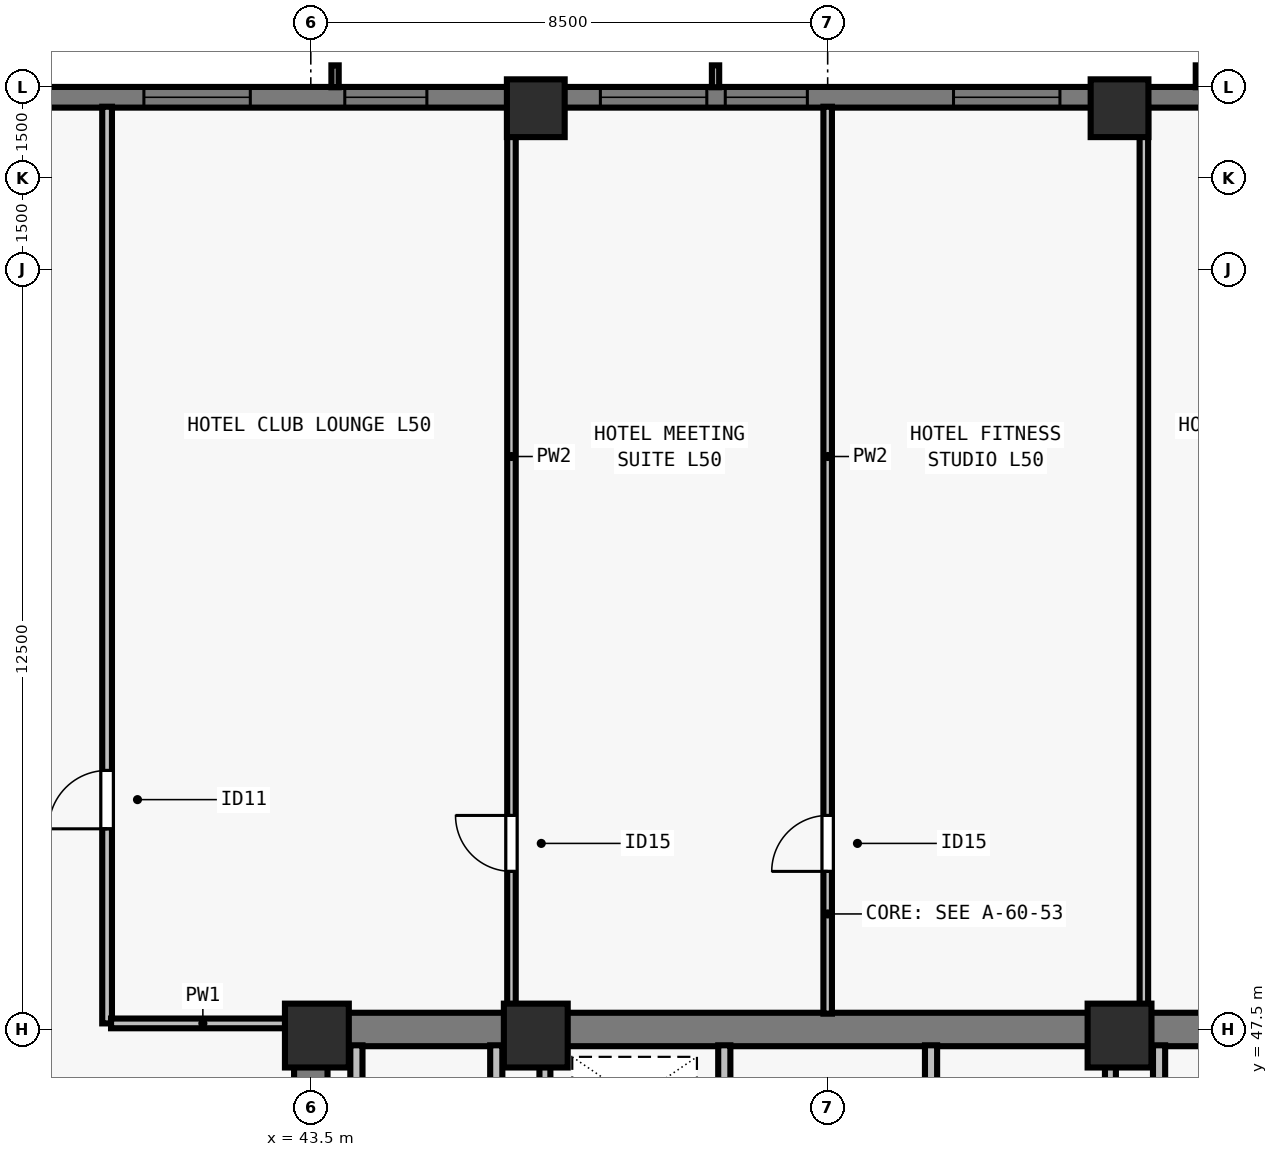
"""IFC4 building model, lengths in metres.
Left out: names, types, materials, properties, quantities, classifications, styles, units other than length and angle.
Written with IfcOpenShell. Run it as: python <this file> out.ifc"""

import sys

from ifc_helpers import new_model, si_unit, direction, frame, frame_2d, origin, origin_2d, place, context, subcontext, project, spatial, rectangle, extrude, element, fill, save


model = new_model("IFC4")
c1 = context("Model", 3, precision=1e-05, world=origin(), true_north=direction((0.0, 1.0)))
c2 = subcontext(c1, "Body", "Model", "MODEL_VIEW")
j1 = project(units=[si_unit("LENGTHUNIT", "METRE"), si_unit("PLANEANGLEUNIT", "RADIAN")], contexts=[c1])
p1 = place(None, origin())
s1 = spatial("IfcSite", under=j1, at=p1, CompositionType="ELEMENT")
p2 = place(p1, origin())
s2 = spatial("IfcBuilding", under=s1, at=p2, CompositionType="ELEMENT")
p3 = place(p2, frame((0.0, 0.0, 183.0)))
s3 = spatial("IfcBuildingStorey", under=s2, at=p3, CompositionType="ELEMENT", Elevation=183.0)
for number, where, z_axis, x_axis in (
    (1, (43.6, 47.4, 0.0), (0.0, 0.0, 1.0), (1.0, 0.0, 0.0)),
    (2, (47.2, 47.4, 0.0), (0.0, 0.0, 1.0), (1.0, 0.0, 0.0)),
    (3, (56.8, 47.4, 0.0), (0.0, 0.0, 1.0), (1.0, 0.0, 0.0)),
):
    element("IfcColumn", number, at=place(p3, frame(where, z_axis=z_axis, x_axis=x_axis)), inside=s3, PredefinedType="COLUMN", context=c2, shape_type="SweptSolid", body=[
        extrude(rectangle(XDim=1.05, YDim=1.05, at=origin_2d()), origin(), (0.0, 0.0, 1.0), 3.5),
    ])
for number, where, z_axis, x_axis in (
    (4, (56.8, 62.65, 0.0), (0.0, 0.0, 1.0), (1.0, 0.0, 0.0)),
    (5, (47.2, 62.65, 0.0), (0.0, 0.0, 1.0), (1.0, 0.0, 0.0)),
):
    element("IfcColumn", number, at=place(p3, frame(where, z_axis=z_axis, x_axis=x_axis)), inside=s3, PredefinedType="COLUMN", context=c2, shape_type="SweptSolid", body=[
        extrude(rectangle(XDim=0.95, YDim=0.95, at=origin_2d()), origin(), (0.0, 0.0, 1.0), 3.5),
    ])
p4 = place(p3, frame((32.0, 62.83, 0.0), z_axis=(0.0, 0.0, 1.0), x_axis=(1.0, 0.0, 0.0)))
e6 = element("IfcWall", 6, at=p4, inside=s3, PredefinedType="SOLIDWALL", context=c2, shape_type="SweptSolid", body=[
    extrude(rectangle(XDim=39.682, YDim=0.34, at=frame_2d((19.841, 0.0))), origin(), (0.0, 0.0, 1.0), 3.28),
])
p5 = place(p4, frame((4.102, 0.0, 0.8)))
e7 = element("IfcOpeningElement", 7, at=p5, cuts=e6, PredefinedType="OPENING", context=c2, shape_type="SweptSolid", body=[
    extrude(rectangle(XDim=1.35, YDim=1.66, at=frame_2d((0.675, 0.83))), frame((0.0, 0.18, 0.0), z_axis=(0.0, -1.0, 0.0), x_axis=(1.0, 0.0, 0.0)), (0.0, 0.0, 1.0), 0.36),
])
p6 = place(p4, frame((8.755, 0.0, 0.8)))
e8 = element("IfcOpeningElement", 8, at=p6, cuts=e6, PredefinedType="OPENING", context=c2, shape_type="SweptSolid", body=[
    extrude(rectangle(XDim=1.75, YDim=1.66, at=frame_2d((0.875, 0.83))), frame((0.0, 0.18, 0.0), z_axis=(0.0, -1.0, 0.0), x_axis=(1.0, 0.0, 0.0)), (0.0, 0.0, 1.0), 0.36),
])
p7 = place(p4, frame((12.059, 0.0, 0.8)))
e9 = element("IfcOpeningElement", 9, at=p7, cuts=e6, PredefinedType="OPENING", context=c2, shape_type="SweptSolid", body=[
    extrude(rectangle(XDim=1.35, YDim=1.66, at=frame_2d((0.675, 0.83))), frame((0.0, 0.18, 0.0), z_axis=(0.0, -1.0, 0.0), x_axis=(1.0, 0.0, 0.0)), (0.0, 0.0, 1.0), 0.36),
])
p8 = place(p4, frame((16.262, 0.0, 0.8)))
e10 = element("IfcOpeningElement", 10, at=p8, cuts=e6, PredefinedType="OPENING", context=c2, shape_type="SweptSolid", body=[
    extrude(rectangle(XDim=1.75, YDim=1.66, at=frame_2d((0.875, 0.83))), frame((0.0, 0.18, 0.0), z_axis=(0.0, -1.0, 0.0), x_axis=(1.0, 0.0, 0.0)), (0.0, 0.0, 1.0), 0.36),
])
p9 = place(p4, frame((18.316, 0.0, 0.8)))
e11 = element("IfcOpeningElement", 11, at=p9, cuts=e6, PredefinedType="OPENING", context=c2, shape_type="SweptSolid", body=[
    extrude(rectangle(XDim=1.35, YDim=1.66, at=frame_2d((0.675, 0.83))), frame((0.0, 0.18, 0.0), z_axis=(0.0, -1.0, 0.0), x_axis=(1.0, 0.0, 0.0)), (0.0, 0.0, 1.0), 0.36),
])
p10 = place(p4, frame((22.07, 0.0, 0.8)))
e12 = element("IfcOpeningElement", 12, at=p10, cuts=e6, PredefinedType="OPENING", context=c2, shape_type="SweptSolid", body=[
    extrude(rectangle(XDim=1.75, YDim=1.66, at=frame_2d((0.875, 0.83))), frame((0.0, 0.18, 0.0), z_axis=(0.0, -1.0, 0.0), x_axis=(1.0, 0.0, 0.0)), (0.0, 0.0, 1.0), 0.36),
])
p11 = place(p4, frame((26.273, 0.0, 0.8)))
e13 = element("IfcOpeningElement", 13, at=p11, cuts=e6, PredefinedType="OPENING", context=c2, shape_type="SweptSolid", body=[
    extrude(rectangle(XDim=1.35, YDim=1.66, at=frame_2d((0.675, 0.83))), frame((0.0, 0.18, 0.0), z_axis=(0.0, -1.0, 0.0), x_axis=(1.0, 0.0, 0.0)), (0.0, 0.0, 1.0), 0.36),
])
p12 = place(p4, frame((33.38, 0.0, 0.8)))
e14 = element("IfcOpeningElement", 14, at=p12, cuts=e6, PredefinedType="OPENING", context=c2, shape_type="SweptSolid", body=[
    extrude(rectangle(XDim=1.35, YDim=1.66, at=frame_2d((0.675, 0.83))), frame((0.0, 0.18, 0.0), z_axis=(0.0, -1.0, 0.0), x_axis=(1.0, 0.0, 0.0)), (0.0, 0.0, 1.0), 0.36),
])
p13 = place(p3, frame((43.225, 47.5, 0.0), z_axis=(0.0, 0.0, 1.0), x_axis=(1.0, 0.0, 0.0)))
e15 = element("IfcWall", 15, at=p13, inside=s3, PredefinedType="SHEAR", context=c2, shape_type="SweptSolid", body=[
    extrude(rectangle(XDim=17.55, YDim=0.55, at=frame_2d((8.775, 0.0))), origin(), (0.0, 0.0, 1.0), 3.28),
])
p14 = place(p3, frame((43.5, 40.8, 0.0), z_axis=(0.0, 0.0, 1.0), x_axis=(0.0, 1.0, 0.0)))
e16 = element("IfcWall", 16, at=p14, inside=s3, PredefinedType="SHEAR", context=c2, shape_type="SweptSolid", body=[
    extrude(rectangle(XDim=6.435, YDim=0.55, at=frame_2d((3.218, 0.0))), origin(), (0.0, 0.0, 1.0), 3.28),
])
p15 = place(p3, frame((50.3, 40.585, 0.0), z_axis=(0.0, 0.0, 1.0), x_axis=(0.0, 1.0, 0.0)))
e17 = element("IfcWall", 17, at=p15, inside=s3, PredefinedType="SOLIDWALL", context=c2, shape_type="SweptSolid", body=[
    extrude(rectangle(XDim=6.655, YDim=0.2, at=frame_2d((3.328, 0.0))), origin(), (0.0, 0.0, 1.0), 3.28),
])
p16 = place(p15, frame((5.065, 0.0, 0.0)))
e18 = element("IfcOpeningElement", 18, at=p16, cuts=e17, PredefinedType="OPENING", context=c2, shape_type="SweptSolid", body=[
    extrude(rectangle(XDim=0.8, YDim=2.08, at=frame_2d((0.4, 1.04))), frame((0.0, 0.11, 0.0), z_axis=(0.0, -1.0, 0.0), x_axis=(1.0, 0.0, 0.0)), (0.0, 0.0, 1.0), 0.22),
])
p17 = place(p3, frame((53.7, 40.585, 0.0), z_axis=(0.0, 0.0, 1.0), x_axis=(0.0, 1.0, 0.0)))
e19 = element("IfcWall", 19, at=p17, inside=s3, PredefinedType="SOLIDWALL", context=c2, shape_type="SweptSolid", body=[
    extrude(rectangle(XDim=6.655, YDim=0.2, at=frame_2d((3.328, 0.0))), origin(), (0.0, 0.0, 1.0), 3.28),
])
p18 = place(p17, frame((0.195, 0.0, 0.0)))
e20 = element("IfcOpeningElement", 20, at=p18, cuts=e19, PredefinedType="OPENING", context=c2, shape_type="SweptSolid", body=[
    extrude(rectangle(XDim=0.8, YDim=2.08, at=frame_2d((0.4, 1.04))), frame((0.0, 0.11, 0.0), z_axis=(0.0, -1.0, 0.0), x_axis=(1.0, 0.0, 0.0)), (0.0, 0.0, 1.0), 0.22),
])
p19 = place(p17, frame((4.265, 0.0, 0.0)))
e21 = element("IfcOpeningElement", 21, at=p19, cuts=e19, PredefinedType="OPENING", context=c2, shape_type="SweptSolid", body=[
    extrude(rectangle(XDim=0.95, YDim=2.12, at=frame_2d((0.475, 1.06))), frame((0.0, 0.11, 0.0), z_axis=(0.0, -1.0, 0.0), x_axis=(1.0, 0.0, 0.0)), (0.0, 0.0, 1.0), 0.22),
])
for number, where, z_axis, x_axis in (
    (22, (46.55, 43.735, 0.0), (0.0, 0.0, 1.0), (0.0, 1.0, 0.0)),
    (23, (44.25, 43.735, 0.0), (0.0, 0.0, 1.0), (0.0, 1.0, 0.0)),
    (24, (57.45, 43.735, 0.0), (0.0, 0.0, 1.0), (0.0, 1.0, 0.0)),
):
    element("IfcWall", number, at=place(p3, frame(where, z_axis=z_axis, x_axis=x_axis)), inside=s3, PredefinedType="SOLIDWALL", context=c2, shape_type="SweptSolid", body=[
        extrude(rectangle(XDim=3.505, YDim=0.2, at=frame_2d((1.752, 0.0))), origin(), (0.0, 0.0, 1.0), 3.28),
    ])
for number, where, z_axis, x_axis in (
    (25, (47.35, 43.735, 0.0), (0.0, 0.0, 1.0), (0.0, 1.0, 0.0)),
    (26, (56.65, 43.735, 0.0), (0.0, 0.0, 1.0), (0.0, 1.0, 0.0)),
):
    element("IfcWall", number, at=place(p3, frame(where, z_axis=z_axis, x_axis=x_axis)), inside=s3, PredefinedType="SOLIDWALL", context=c2, shape_type="SweptSolid", body=[
        extrude(rectangle(XDim=3.505, YDim=0.18, at=frame_2d((1.752, 0.0))), origin(), (0.0, 0.0, 1.0), 3.28),
    ])
p20 = place(p3, frame((40.15, 47.6, 0.0), z_axis=(0.0, 0.0, 1.0), x_axis=(0.0, 1.0, 0.0)))
e27 = element("IfcWall", 27, at=p20, inside=s3, PredefinedType="PARTITIONING", context=c2, shape_type="SweptSolid", body=[
    extrude(rectangle(XDim=15.075, YDim=0.16, at=frame_2d((7.538, 0.0))), origin(), (0.0, 0.0, 1.0), 2.555),
])
p21 = place(p20, frame((3.2, 0.0, 0.0)))
e28 = element("IfcOpeningElement", 28, at=p21, cuts=e27, PredefinedType="OPENING", context=c2, shape_type="SweptSolid", body=[
    extrude(rectangle(XDim=0.96, YDim=2.12, at=frame_2d((0.48, 1.06))), frame((0.0, 0.09, 0.0), z_axis=(0.0, -1.0, 0.0), x_axis=(1.0, 0.0, 0.0)), (0.0, 0.0, 1.0), 0.18),
])
p22 = place(p3, frame((40.215, 47.6, 0.0), z_axis=(0.0, 0.0, 1.0), x_axis=(1.0, 0.0, 0.0)))
e29 = element("IfcWall", 29, at=p22, inside=s3, PredefinedType="PARTITIONING", context=c2, shape_type="SweptSolid", body=[
    extrude(rectangle(XDim=3.02, YDim=0.16, at=frame_2d((1.51, 0.0))), origin(), (0.0, 0.0, 1.0), 3.28),
])
p23 = place(p3, frame((46.8, 47.76, 0.0), z_axis=(0.0, 0.0, 1.0), x_axis=(0.0, 1.0, 0.0)))
e30 = element("IfcWall", 30, at=p23, inside=s3, PredefinedType="PARTITIONING", context=c2, shape_type="SweptSolid", body=[
    extrude(rectangle(XDim=14.915, YDim=0.14, at=frame_2d((7.458, 0.0))), origin(), (0.0, 0.0, 1.0), 3.28),
])
p24 = place(p23, frame((2.34, 0.0, 0.0)))
e31 = element("IfcOpeningElement", 31, at=p24, cuts=e30, PredefinedType="OPENING", context=c2, shape_type="SweptSolid", body=[
    extrude(rectangle(XDim=0.92, YDim=2.12, at=frame_2d((0.46, 1.06))), frame((0.0, 0.08, 0.0), z_axis=(0.0, -1.0, 0.0), x_axis=(1.0, 0.0, 0.0)), (0.0, 0.0, 1.0), 0.16),
])
p25 = place(p3, frame((52.0, 47.76, 0.0), z_axis=(0.0, 0.0, 1.0), x_axis=(0.0, 1.0, 0.0)))
e32 = element("IfcWall", 32, at=p25, inside=s3, PredefinedType="PARTITIONING", context=c2, shape_type="SweptSolid", body=[
    extrude(rectangle(XDim=14.915, YDim=0.14, at=frame_2d((7.458, 0.0))), origin(), (0.0, 0.0, 1.0), 2.896),
])
p26 = place(p25, frame((2.34, 0.0, 0.0)))
e33 = element("IfcOpeningElement", 33, at=p26, cuts=e32, PredefinedType="OPENING", context=c2, shape_type="SweptSolid", body=[
    extrude(rectangle(XDim=0.92, YDim=2.12, at=frame_2d((0.46, 1.06))), frame((0.0, 0.08, 0.0), z_axis=(0.0, -1.0, 0.0), x_axis=(1.0, 0.0, 0.0)), (0.0, 0.0, 1.0), 0.16),
])
p27 = place(p3, frame((57.2, 47.76, 0.0), z_axis=(0.0, 0.0, 1.0), x_axis=(0.0, 1.0, 0.0)))
e34 = element("IfcWall", 34, at=p27, inside=s3, PredefinedType="PARTITIONING", context=c2, shape_type="SweptSolid", body=[
    extrude(rectangle(XDim=14.915, YDim=0.14, at=frame_2d((7.458, 0.0))), origin(), (0.0, 0.0, 1.0), 3.28),
])
p28 = place(p6, origin())
e35 = element("IfcWindow", 35, at=p28, inside=s3, PartitioningType="SINGLE_PANEL", PredefinedType="WINDOW", context=c2, shape_type="SweptSolid", body=[
    extrude(rectangle(XDim=1.75, YDim=1.66, at=frame_2d((0.875, 0.83))), frame((0.0, -0.05, 0.0), z_axis=(0.0, -1.0, 0.0), x_axis=(1.0, 0.0, 0.0)), (0.0, 0.0, 1.0), 0.06),
])
fill(e8, e35)
p29 = place(p7, origin())
e36 = element("IfcWindow", 36, at=p29, inside=s3, PartitioningType="SINGLE_PANEL", PredefinedType="WINDOW", context=c2, shape_type="SweptSolid", body=[
    extrude(rectangle(XDim=1.35, YDim=1.66, at=frame_2d((0.675, 0.83))), frame((0.0, -0.05, 0.0), z_axis=(0.0, -1.0, 0.0), x_axis=(1.0, 0.0, 0.0)), (0.0, 0.0, 1.0), 0.06),
])
fill(e9, e36)
p30 = place(p8, origin())
e37 = element("IfcWindow", 37, at=p30, inside=s3, PartitioningType="SINGLE_PANEL", PredefinedType="WINDOW", context=c2, shape_type="SweptSolid", body=[
    extrude(rectangle(XDim=1.75, YDim=1.66, at=frame_2d((0.875, 0.83))), frame((0.0, -0.05, 0.0), z_axis=(0.0, -1.0, 0.0), x_axis=(1.0, 0.0, 0.0)), (0.0, 0.0, 1.0), 0.06),
])
fill(e10, e37)
p31 = place(p9, origin())
e38 = element("IfcWindow", 38, at=p31, inside=s3, PartitioningType="SINGLE_PANEL", PredefinedType="WINDOW", context=c2, shape_type="SweptSolid", body=[
    extrude(rectangle(XDim=1.35, YDim=1.66, at=frame_2d((0.675, 0.83))), frame((0.0, -0.05, 0.0), z_axis=(0.0, -1.0, 0.0), x_axis=(1.0, 0.0, 0.0)), (0.0, 0.0, 1.0), 0.06),
])
fill(e11, e38)
p32 = place(p10, origin())
e39 = element("IfcWindow", 39, at=p32, inside=s3, PartitioningType="SINGLE_PANEL", PredefinedType="WINDOW", context=c2, shape_type="SweptSolid", body=[
    extrude(rectangle(XDim=1.75, YDim=1.66, at=frame_2d((0.875, 0.83))), frame((0.0, -0.05, 0.0), z_axis=(0.0, -1.0, 0.0), x_axis=(1.0, 0.0, 0.0)), (0.0, 0.0, 1.0), 0.06),
])
fill(e12, e39)
p33 = place(p21, origin())
e40 = element("IfcDoor", 40, at=p33, inside=s3, OperationType="SINGLE_SWING_LEFT", PredefinedType="DOOR", context=c2, shape_type="SweptSolid", body=[
    extrude(rectangle(XDim=0.96, YDim=2.12, at=frame_2d((0.48, 1.06))), frame((0.0, 0.025, 0.0), z_axis=(0.0, -1.0, 0.0), x_axis=(1.0, 0.0, 0.0)), (0.0, 0.0, 1.0), 0.05),
])
fill(e28, e40)
p34 = place(p24, origin())
e41 = element("IfcDoor", 41, at=p34, inside=s3, OperationType="SINGLE_SWING_RIGHT", PredefinedType="DOOR", context=c2, shape_type="SweptSolid", body=[
    extrude(rectangle(XDim=0.92, YDim=2.12, at=frame_2d((0.46, 1.06))), frame((0.0, 0.025, 0.0), z_axis=(0.0, -1.0, 0.0), x_axis=(1.0, 0.0, 0.0)), (0.0, 0.0, 1.0), 0.05),
])
fill(e31, e41)
p35 = place(p26, origin())
e42 = element("IfcDoor", 42, at=p35, inside=s3, OperationType="SINGLE_SWING_LEFT", PredefinedType="DOOR", context=c2, shape_type="SweptSolid", body=[
    extrude(rectangle(XDim=0.92, YDim=2.12, at=frame_2d((0.46, 1.06))), frame((0.0, 0.025, 0.0), z_axis=(0.0, -1.0, 0.0), x_axis=(1.0, 0.0, 0.0)), (0.0, 0.0, 1.0), 0.05),
])
fill(e33, e42)
save(model, sys.argv[1])
